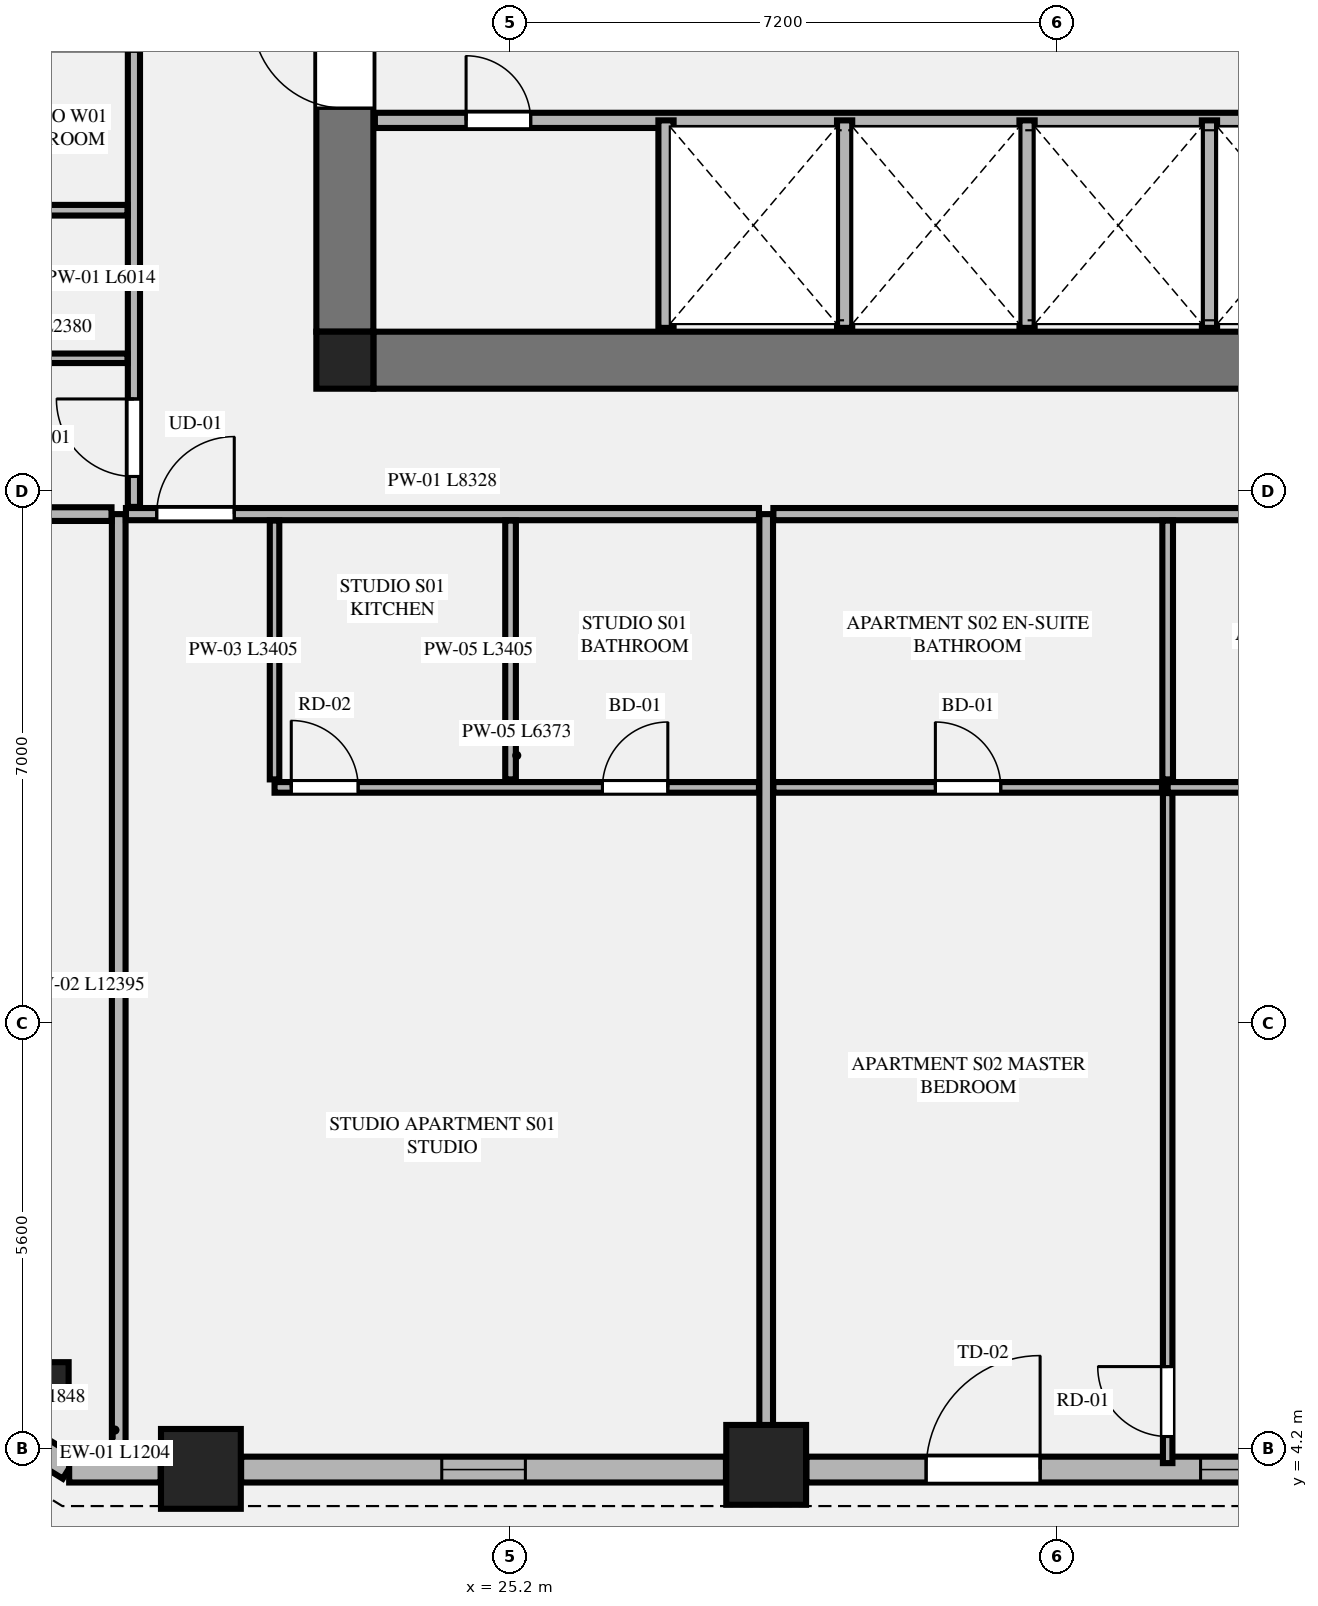
"""IFC4 building model, lengths in metres.
Left out: names, types, materials, properties, quantities, classifications, styles, units other than length and angle.
Written with IfcOpenShell. Run it as: python <this file> out.ifc"""

import sys

from ifc_helpers import new_model, si_unit, direction, frame, frame_2d, origin, origin_2d, place, context, subcontext, project, spatial, rectangle, extrude, element, fill, save


model = new_model("IFC4")
c1 = context("Model", 3, precision=1e-05, world=origin(), true_north=direction((0.0, 1.0)))
c2 = subcontext(c1, "Body", "Model", "MODEL_VIEW")
j1 = project(units=[si_unit("LENGTHUNIT", "METRE"), si_unit("PLANEANGLEUNIT", "RADIAN")], contexts=[c1])
p1 = place(None, origin())
s1 = spatial("IfcSite", under=j1, at=p1, CompositionType="ELEMENT")
p2 = place(p1, origin())
s2 = spatial("IfcBuilding", under=s1, at=p2, CompositionType="ELEMENT")
p3 = place(p2, frame((0.0, 0.0, 98.4)))
s3 = spatial("IfcBuildingStorey", under=s2, at=p3, CompositionType="ELEMENT", Elevation=98.4)
p4 = place(p3, frame((23.025, 18.525, 0.0), z_axis=(0.0, 0.0, 1.0), x_axis=(1.0, 0.0, 0.0)))
e1 = element("IfcColumn", 1, at=p4, inside=s3, PredefinedType="COLUMN", context=c2, shape_type="SweptSolid", body=[
    extrude(rectangle(XDim=0.75, YDim=0.75, at=origin_2d()), origin(), (0.0, 0.0, 1.0), 3.55),
])
p5 = place(p3, frame((23.4, 18.525, 0.0), z_axis=(0.0, 0.0, 1.0), x_axis=(1.0, 0.0, 0.0)))
e2 = element("IfcWall", 2, at=p5, inside=s3, PredefinedType="SHEAR", context=c2, shape_type="SweptSolid", body=[
    extrude(rectangle(XDim=18.0, YDim=0.75, at=frame_2d((9.0, 0.0))), origin(), (0.0, 0.0, 1.0), 3.34),
])
p6 = place(p3, frame((23.025, 18.9, 0.0), z_axis=(0.0, 0.0, 1.0), x_axis=(0.0, 1.0, 0.0)))
e3 = element("IfcWall", 3, at=p6, inside=s3, PredefinedType="SHEAR", context=c2, shape_type="SweptSolid", body=[
    extrude(rectangle(XDim=14.0, YDim=0.75, at=frame_2d((7.0, 0.0))), origin(), (0.0, 0.0, 1.0), 3.34),
])
p7 = place(p6, frame((2.94, 0.0, 0.0)))
e4 = element("IfcOpeningElement", 4, at=p7, cuts=e3, PredefinedType="OPENING", context=c2, shape_type="SweptSolid", body=[
    extrude(rectangle(XDim=1.22, YDim=2.25, at=frame_2d((0.61, 1.125))), frame((0.0, 0.385, 0.0), z_axis=(0.0, -1.0, 0.0), x_axis=(1.0, 0.0, 0.0)), (0.0, 0.0, 1.0), 0.77),
])
for number, where, z_axis, x_axis in (
    (5, (21.131, 3.939, 0.0), (0.0, 0.0, 1.0), (1.0, 0.0, 0.0)),
    (6, (28.568, 3.992, 0.0), (0.0, 0.0, 1.0), (1.0, 0.0, 0.0)),
):
    element("IfcColumn", number, at=place(p3, frame(where, z_axis=z_axis, x_axis=x_axis)), inside=s3, PredefinedType="COLUMN", context=c2, shape_type="SweptSolid", body=[
        extrude(rectangle(XDim=1.05, YDim=1.05, at=origin_2d()), origin(), (0.0, 0.0, 1.0), 3.55),
    ])
p8 = place(p3, frame((19.141, 5.093, 0.0), z_axis=(0.0, 0.0, 1.0), x_axis=(0.865160173452, -0.501495637342, 0.0)))
e7 = element("IfcColumn", 7, at=p8, inside=s3, PredefinedType="PILASTER", context=c2, shape_type="SweptSolid", body=[
    extrude(rectangle(XDim=0.5, YDim=0.35, at=origin_2d()), origin(), (0.0, 0.0, 1.0), 3.55),
])
p9 = place(p3, frame((23.42, 21.68, 0.0), z_axis=(0.0, 0.0, 1.0), x_axis=(1.0, 0.0, 0.0)))
e8 = element("IfcWall", 8, at=p9, inside=s3, PredefinedType="PLUMBINGWALL", context=c2, shape_type="SweptSolid", body=[
    extrude(rectangle(XDim=17.96, YDim=0.2, at=frame_2d((8.98, 0.0))), origin(), (0.0, 0.0, 1.0), 3.34),
])
p10 = place(p9, frame((11.6, 0.0, 0.0)))
e9 = element("IfcOpeningElement", 9, at=p10, cuts=e8, PredefinedType="OPENING", context=c2, shape_type="SweptSolid", body=[
    extrude(rectangle(XDim=1.1, YDim=2.2, at=frame_2d((0.55, 1.1))), frame((0.0, 0.11, 0.0), z_axis=(0.0, -1.0, 0.0), x_axis=(1.0, 0.0, 0.0)), (0.0, 0.0, 1.0), 0.22),
])
p11 = place(p9, frame((1.2, 0.0, 0.0)))
e10 = element("IfcOpeningElement", 10, at=p11, cuts=e8, PredefinedType="OPENING", context=c2, shape_type="SweptSolid", body=[
    extrude(rectangle(XDim=0.85, YDim=2.05, at=frame_2d((0.425, 1.025))), frame((0.0, 0.11, 0.0), z_axis=(0.0, -1.0, 0.0), x_axis=(1.0, 0.0, 0.0)), (0.0, 0.0, 1.0), 0.22),
])
p12 = place(p9, frame((13.55, 0.0, 0.0)))
e11 = element("IfcOpeningElement", 11, at=p12, cuts=e8, PredefinedType="OPENING", context=c2, shape_type="SweptSolid", body=[
    extrude(rectangle(XDim=0.85, YDim=2.05, at=frame_2d((0.425, 1.025))), frame((0.0, 0.11, 0.0), z_axis=(0.0, -1.0, 0.0), x_axis=(1.0, 0.0, 0.0)), (0.0, 0.0, 1.0), 0.22),
])
p13 = place(p9, frame((15.85, 0.0, 0.0)))
e12 = element("IfcOpeningElement", 12, at=p13, cuts=e8, PredefinedType="OPENING", context=c2, shape_type="SweptSolid", body=[
    extrude(rectangle(XDim=0.85, YDim=2.05, at=frame_2d((0.425, 1.025))), frame((0.0, 0.11, 0.0), z_axis=(0.0, -1.0, 0.0), x_axis=(1.0, 0.0, 0.0)), (0.0, 0.0, 1.0), 0.22),
])
for number, where, z_axis, x_axis in (
    (13, (27.25, 18.95, 0.0), (0.0, 0.0, 1.0), (0.0, 1.0, 0.0)),
    (14, (29.6, 18.95, 0.0), (0.0, 0.0, 1.0), (0.0, 1.0, 0.0)),
    (15, (32.0, 18.95, 0.0), (0.0, 0.0, 1.0), (0.0, 1.0, 0.0)),
    (16, (34.4, 18.95, 0.0), (0.0, 0.0, 1.0), (0.0, 1.0, 0.0)),
):
    element("IfcWall", number, at=place(p3, frame(where, z_axis=z_axis, x_axis=x_axis)), inside=s3, PredefinedType="PLUMBINGWALL", context=c2, shape_type="SweptSolid", body=[
        extrude(rectangle(XDim=2.73, YDim=0.2, at=frame_2d((1.365, 0.0))), origin(), (0.0, 0.0, 1.0), 3.34),
    ])
p14 = place(p3, frame((17.829, 4.923, 0.0), z_axis=(0.0, 0.0, 1.0), x_axis=(0.851798915137, -0.523868884523, 0.0)))
e17 = element("IfcWall", 17, at=p14, inside=s3, PredefinedType="STANDARD", context=c2, shape_type="SweptSolid", body=[
    extrude(rectangle(XDim=1.848, YDim=0.34, at=frame_2d((0.924, 0.0))), origin(), (0.0, 0.0, 1.0), 3.34),
])
p15 = place(p3, frame((19.398, 3.93, 0.0), z_axis=(0.0, 0.0, 1.0), x_axis=(1.0, 0.0, 0.0)))
e18 = element("IfcWall", 18, at=p15, inside=s3, PredefinedType="STANDARD", context=c2, shape_type="SweptSolid", body=[
    extrude(rectangle(XDim=1.204, YDim=0.34, at=frame_2d((0.602, 0.0))), origin(), (0.0, 0.0, 1.0), 3.34),
])
p16 = place(p3, frame((21.66, 3.93, 0.0), z_axis=(0.0, 0.0, 1.0), x_axis=(1.0, 0.0, 0.0)))
e19 = element("IfcWall", 19, at=p16, inside=s3, PredefinedType="STANDARD", context=c2, shape_type="SweptSolid", body=[
    extrude(rectangle(XDim=6.379, YDim=0.34, at=frame_2d((3.189, 0.0))), origin(), (0.0, 0.0, 1.0), 2.797),
])
p17 = place(p16, frame((2.64, 0.0, 0.75)))
e20 = element("IfcOpeningElement", 20, at=p17, cuts=e19, PredefinedType="OPENING", context=c2, shape_type="SweptSolid", body=[
    extrude(rectangle(XDim=1.1, YDim=1.897, at=frame_2d((0.55, 0.948))), frame((0.0, 0.18, 0.0), z_axis=(0.0, -1.0, 0.0), x_axis=(1.0, 0.0, 0.0)), (0.0, 0.0, 1.0), 0.36),
])
p18 = place(p3, frame((29.097, 3.93, 0.0), z_axis=(0.0, 0.0, 1.0), x_axis=(1.0, 0.0, 0.0)))
e21 = element("IfcWall", 21, at=p18, inside=s3, PredefinedType="STANDARD", context=c2, shape_type="SweptSolid", body=[
    extrude(rectangle(XDim=6.606, YDim=0.34, at=frame_2d((3.303, 0.0))), origin(), (0.0, 0.0, 1.0), 2.797),
])
p19 = place(p18, frame((1.575, 0.0, 0.0)))
e22 = element("IfcOpeningElement", 22, at=p19, cuts=e21, PredefinedType="OPENING", context=c2, shape_type="SweptSolid", body=[
    extrude(rectangle(XDim=1.5, YDim=2.3, at=frame_2d((0.75, 1.15))), frame((0.0, 0.18, 0.0), z_axis=(0.0, -1.0, 0.0), x_axis=(1.0, 0.0, 0.0)), (0.0, 0.0, 1.0), 0.36),
])
p20 = place(p18, frame((5.186, 0.0, 0.75)))
e23 = element("IfcOpeningElement", 23, at=p20, cuts=e21, PredefinedType="OPENING", context=c2, shape_type="SweptSolid", body=[
    extrude(rectangle(XDim=1.1, YDim=1.897, at=frame_2d((0.55, 0.948))), frame((0.0, 0.18, 0.0), z_axis=(0.0, -1.0, 0.0), x_axis=(1.0, 0.0, 0.0)), (0.0, 0.0, 1.0), 0.36),
])
p21 = place(p3, frame((20.05, 4.105, 0.0), z_axis=(0.0, 0.0, 1.0), x_axis=(0.0, 1.0, 0.0)))
e24 = element("IfcWall", 24, at=p21, inside=s3, PredefinedType="PARTITIONING", context=c2, shape_type="SweptSolid", body=[
    extrude(rectangle(XDim=12.395, YDim=0.18, at=frame_2d((6.198, 0.0))), origin(), (0.0, 0.0, 1.0), 3.34),
])
p22 = place(p3, frame((28.568, 4.105, 0.0), z_axis=(0.0, 0.0, 1.0), x_axis=(0.0, 1.0, 0.0)))
e25 = element("IfcWall", 25, at=p22, inside=s3, PredefinedType="PARTITIONING", context=c2, shape_type="SweptSolid", body=[
    extrude(rectangle(XDim=12.395, YDim=0.18, at=frame_2d((6.198, 0.0))), origin(), (0.0, 0.0, 1.0), 2.722),
])
p23 = place(p3, frame((20.145, 16.5, 0.0), z_axis=(0.0, 0.0, 1.0), x_axis=(1.0, 0.0, 0.0)))
e26 = element("IfcWall", 26, at=p23, inside=s3, PredefinedType="PARTITIONING", context=c2, shape_type="SweptSolid", body=[
    extrude(rectangle(XDim=8.328, YDim=0.16, at=frame_2d((4.164, 0.0))), origin(), (0.0, 0.0, 1.0), 3.34),
])
p24 = place(p23, frame((0.405, 0.0, 0.0)))
e27 = element("IfcOpeningElement", 27, at=p24, cuts=e26, PredefinedType="OPENING", context=c2, shape_type="SweptSolid", body=[
    extrude(rectangle(XDim=1.02, YDim=2.25, at=frame_2d((0.51, 1.125))), frame((0.0, 0.09, 0.0), z_axis=(0.0, -1.0, 0.0), x_axis=(1.0, 0.0, 0.0)), (0.0, 0.0, 1.0), 0.18),
])
p25 = place(p3, frame((22.1, 13.01, 0.0), z_axis=(0.0, 0.0, 1.0), x_axis=(0.0, 1.0, 0.0)))
e28 = element("IfcWall", 28, at=p25, inside=s3, PredefinedType="PARTITIONING", context=c2, shape_type="SweptSolid", body=[
    extrude(rectangle(XDim=3.405, YDim=0.125, at=frame_2d((1.703, 0.0))), origin(), (0.0, 0.0, 1.0), 2.722),
])
p26 = place(p3, frame((22.1, 12.905, 0.0), z_axis=(0.0, 0.0, 1.0), x_axis=(1.0, 0.0, 0.0)))
e29 = element("IfcWall", 29, at=p26, inside=s3, PredefinedType="PLUMBINGWALL", context=c2, shape_type="SweptSolid", body=[
    extrude(rectangle(XDim=6.373, YDim=0.14, at=frame_2d((3.187, 0.0))), origin(), (0.0, 0.0, 1.0), 3.34),
])
p27 = place(p26, frame((4.314, 0.0, 0.0)))
e30 = element("IfcOpeningElement", 30, at=p27, cuts=e29, PredefinedType="OPENING", context=c2, shape_type="SweptSolid", body=[
    extrude(rectangle(XDim=0.86, YDim=2.1, at=frame_2d((0.43, 1.05))), frame((0.0, 0.08, 0.0), z_axis=(0.0, -1.0, 0.0), x_axis=(1.0, 0.0, 0.0)), (0.0, 0.0, 1.0), 0.16),
])
p28 = place(p26, frame((0.22, 0.0, 0.0)))
e31 = element("IfcOpeningElement", 31, at=p28, cuts=e29, PredefinedType="OPENING", context=c2, shape_type="SweptSolid", body=[
    extrude(rectangle(XDim=0.88, YDim=2.15, at=frame_2d((0.44, 1.075))), frame((0.0, 0.08, 0.0), z_axis=(0.0, -1.0, 0.0), x_axis=(1.0, 0.0, 0.0)), (0.0, 0.0, 1.0), 0.16),
])
p29 = place(p3, frame((25.205, 13.01, 0.0), z_axis=(0.0, 0.0, 1.0), x_axis=(0.0, 1.0, 0.0)))
e32 = element("IfcWall", 32, at=p29, inside=s3, PredefinedType="PLUMBINGWALL", context=c2, shape_type="SweptSolid", body=[
    extrude(rectangle(XDim=3.405, YDim=0.14, at=frame_2d((1.703, 0.0))), origin(), (0.0, 0.0, 1.0), 3.34),
])
p30 = place(p3, frame((28.663, 16.5, 0.0), z_axis=(0.0, 0.0, 1.0), x_axis=(1.0, 0.0, 0.0)))
e33 = element("IfcWall", 33, at=p30, inside=s3, PredefinedType="PARTITIONING", context=c2, shape_type="SweptSolid", body=[
    extrude(rectangle(XDim=15.992, YDim=0.16, at=frame_2d((7.996, 0.0))), origin(), (0.0, 0.0, 1.0), 3.34),
])
p31 = place(p30, frame((14.087, 0.0, 0.0)))
e34 = element("IfcOpeningElement", 34, at=p31, cuts=e33, PredefinedType="OPENING", context=c2, shape_type="SweptSolid", body=[
    extrude(rectangle(XDim=1.02, YDim=2.25, at=frame_2d((0.51, 1.125))), frame((0.0, 0.09, 0.0), z_axis=(0.0, -1.0, 0.0), x_axis=(1.0, 0.0, 0.0)), (0.0, 0.0, 1.0), 0.18),
])
p32 = place(p3, frame((33.85, 12.905, 0.0), z_axis=(0.0, 0.0, 1.0), x_axis=(1.0, 0.0, 0.0)))
e35 = element("IfcWall", 35, at=p32, inside=s3, PredefinedType="PLUMBINGWALL", context=c2, shape_type="SweptSolid", body=[
    extrude(rectangle(XDim=8.65, YDim=0.14, at=frame_2d((4.325, 0.0))), origin(), (0.0, 0.0, 1.0), 3.34),
])
p33 = place(p32, frame((2.2, 0.0, 0.0)))
e36 = element("IfcOpeningElement", 36, at=p33, cuts=e35, PredefinedType="OPENING", context=c2, shape_type="SweptSolid", body=[
    extrude(rectangle(XDim=0.86, YDim=2.1, at=frame_2d((0.43, 1.05))), frame((0.0, 0.08, 0.0), z_axis=(0.0, -1.0, 0.0), x_axis=(1.0, 0.0, 0.0)), (0.0, 0.0, 1.0), 0.16),
])
p34 = place(p32, frame((5.45, 0.0, 0.0)))
e37 = element("IfcOpeningElement", 37, at=p34, cuts=e35, PredefinedType="OPENING", context=c2, shape_type="SweptSolid", body=[
    extrude(rectangle(XDim=0.88, YDim=2.15, at=frame_2d((0.44, 1.075))), frame((0.0, 0.08, 0.0), z_axis=(0.0, -1.0, 0.0), x_axis=(1.0, 0.0, 0.0)), (0.0, 0.0, 1.0), 0.16),
])
p35 = place(p3, frame((28.663, 12.905, 0.0), z_axis=(0.0, 0.0, 1.0), x_axis=(1.0, 0.0, 0.0)))
e38 = element("IfcWall", 38, at=p35, inside=s3, PredefinedType="PLUMBINGWALL", context=c2, shape_type="SweptSolid", body=[
    extrude(rectangle(XDim=5.112, YDim=0.14, at=frame_2d((2.556, 0.0))), origin(), (0.0, 0.0, 1.0), 3.34),
])
p36 = place(p35, frame((2.131, 0.0, 0.0)))
e39 = element("IfcOpeningElement", 39, at=p36, cuts=e38, PredefinedType="OPENING", context=c2, shape_type="SweptSolid", body=[
    extrude(rectangle(XDim=0.86, YDim=2.1, at=frame_2d((0.43, 1.05))), frame((0.0, 0.08, 0.0), z_axis=(0.0, -1.0, 0.0), x_axis=(1.0, 0.0, 0.0)), (0.0, 0.0, 1.0), 0.16),
])
p37 = place(p3, frame((33.85, 13.01, 0.0), z_axis=(0.0, 0.0, 1.0), x_axis=(0.0, 1.0, 0.0)))
e40 = element("IfcWall", 40, at=p37, inside=s3, PredefinedType="PLUMBINGWALL", context=c2, shape_type="SweptSolid", body=[
    extrude(rectangle(XDim=3.405, YDim=0.14, at=frame_2d((1.703, 0.0))), origin(), (0.0, 0.0, 1.0), 3.34),
])
p38 = place(p3, frame((33.85, 4.015, 0.0), z_axis=(0.0, 0.0, 1.0), x_axis=(0.0, 1.0, 0.0)))
e41 = element("IfcWall", 41, at=p38, inside=s3, PredefinedType="PARTITIONING", context=c2, shape_type="SweptSolid", body=[
    extrude(rectangle(XDim=8.815, YDim=0.125, at=frame_2d((4.408, 0.0))), origin(), (0.0, 0.0, 1.0), 3.34),
])
p39 = place(p38, frame((0.35, 0.0, 0.0)))
e42 = element("IfcOpeningElement", 42, at=p39, cuts=e41, PredefinedType="OPENING", context=c2, shape_type="SweptSolid", body=[
    extrude(rectangle(XDim=0.92, YDim=2.15, at=frame_2d((0.46, 1.075))), frame((0.0, 0.073, 0.0), z_axis=(0.0, -1.0, 0.0), x_axis=(1.0, 0.0, 0.0)), (0.0, 0.0, 1.0), 0.145),
])
p40 = place(p3, frame((12.185, 16.5, 0.0), z_axis=(0.0, 0.0, 1.0), x_axis=(1.0, 0.0, 0.0)))
e43 = element("IfcWall", 43, at=p40, inside=s3, PredefinedType="PARTITIONING", context=c2, shape_type="SweptSolid", body=[
    extrude(rectangle(XDim=7.77, YDim=0.18, at=frame_2d((3.885, 0.0))), origin(), (0.0, 0.0, 1.0), 3.34),
])
p41 = place(p3, frame((20.25, 16.595, 0.0), z_axis=(0.0, 0.0, 1.0), x_axis=(0.0, 1.0, 0.0)))
e44 = element("IfcWall", 44, at=p41, inside=s3, PredefinedType="PARTITIONING", context=c2, shape_type="SweptSolid", body=[
    extrude(rectangle(XDim=6.014, YDim=0.16, at=frame_2d((3.007, 0.0))), origin(), (0.0, 0.0, 1.0), 3.34),
])
p42 = place(p41, frame((0.4, 0.0, 0.0)))
e45 = element("IfcOpeningElement", 45, at=p42, cuts=e44, PredefinedType="OPENING", context=c2, shape_type="SweptSolid", body=[
    extrude(rectangle(XDim=1.02, YDim=2.25, at=frame_2d((0.51, 1.125))), frame((0.0, 0.09, 0.0), z_axis=(0.0, -1.0, 0.0), x_axis=(1.0, 0.0, 0.0)), (0.0, 0.0, 1.0), 0.18),
])
p43 = place(p3, frame((17.785, 18.55, 0.0), z_axis=(0.0, 0.0, 1.0), x_axis=(1.0, 0.0, 0.0)))
e46 = element("IfcWall", 46, at=p43, inside=s3, PredefinedType="PARTITIONING", context=c2, shape_type="SweptSolid", body=[
    extrude(rectangle(XDim=2.38, YDim=0.125, at=frame_2d((1.19, 0.0))), origin(), (0.0, 0.0, 1.0), 2.722),
])
p44 = place(p3, frame((17.785, 20.498, 0.0), z_axis=(0.0, 0.0, 1.0), x_axis=(1.0, 0.0, 0.0)))
e47 = element("IfcWall", 47, at=p44, inside=s3, PredefinedType="PLUMBINGWALL", context=c2, shape_type="SweptSolid", body=[
    extrude(rectangle(XDim=2.38, YDim=0.14, at=frame_2d((1.19, 0.0))), origin(), (0.0, 0.0, 1.0), 3.34),
])
p45 = place(p7, origin())
e48 = element("IfcDoor", 48, at=p45, inside=s3, OperationType="SINGLE_SWING_RIGHT", PredefinedType="DOOR", context=c2, shape_type="SweptSolid", body=[
    extrude(rectangle(XDim=1.22, YDim=2.25, at=frame_2d((0.61, 1.125))), frame((0.0, 0.025, 0.0), z_axis=(0.0, -1.0, 0.0), x_axis=(1.0, 0.0, 0.0)), (0.0, 0.0, 1.0), 0.05),
])
fill(e4, e48)
p46 = place(p11, origin())
e49 = element("IfcDoor", 49, at=p46, inside=s3, OperationType="SINGLE_SWING_LEFT", PredefinedType="DOOR", context=c2, shape_type="SweptSolid", body=[
    extrude(rectangle(XDim=0.85, YDim=2.05, at=frame_2d((0.425, 1.025))), frame((0.0, 0.025, 0.0), z_axis=(0.0, -1.0, 0.0), x_axis=(1.0, 0.0, 0.0)), (0.0, 0.0, 1.0), 0.05),
])
fill(e10, e49)
p47 = place(p17, origin())
e50 = element("IfcWindow", 50, at=p47, inside=s3, PartitioningType="SINGLE_PANEL", PredefinedType="WINDOW", context=c2, shape_type="SweptSolid", body=[
    extrude(rectangle(XDim=1.1, YDim=1.897, at=frame_2d((0.55, 0.948))), frame((0.0, 0.03, 0.0), z_axis=(0.0, -1.0, 0.0), x_axis=(1.0, 0.0, 0.0)), (0.0, 0.0, 1.0), 0.06),
])
fill(e20, e50)
p48 = place(p19, origin())
e51 = element("IfcDoor", 51, at=p48, inside=s3, OperationType="SINGLE_SWING_RIGHT", PredefinedType="DOOR", context=c2, shape_type="SweptSolid", body=[
    extrude(rectangle(XDim=1.5, YDim=2.3, at=frame_2d((0.75, 1.15))), frame((0.0, 0.025, 0.0), z_axis=(0.0, -1.0, 0.0), x_axis=(1.0, 0.0, 0.0)), (0.0, 0.0, 1.0), 0.05),
])
fill(e22, e51)
p49 = place(p27, origin())
e52 = element("IfcDoor", 52, at=p49, inside=s3, OperationType="SINGLE_SWING_RIGHT", PredefinedType="DOOR", context=c2, shape_type="SweptSolid", body=[
    extrude(rectangle(XDim=0.86, YDim=2.1, at=frame_2d((0.43, 1.05))), frame((0.0, 0.025, 0.0), z_axis=(0.0, -1.0, 0.0), x_axis=(1.0, 0.0, 0.0)), (0.0, 0.0, 1.0), 0.05),
])
fill(e30, e52)
p50 = place(p24, origin())
e53 = element("IfcDoor", 53, at=p50, inside=s3, OperationType="SINGLE_SWING_RIGHT", PredefinedType="DOOR", context=c2, shape_type="SweptSolid", body=[
    extrude(rectangle(XDim=1.02, YDim=2.25, at=frame_2d((0.51, 1.125))), frame((0.0, 0.025, 0.0), z_axis=(0.0, -1.0, 0.0), x_axis=(1.0, 0.0, 0.0)), (0.0, 0.0, 1.0), 0.05),
])
fill(e27, e53)
p51 = place(p28, origin())
e54 = element("IfcDoor", 54, at=p51, inside=s3, OperationType="SINGLE_SWING_LEFT", PredefinedType="DOOR", context=c2, shape_type="SweptSolid", body=[
    extrude(rectangle(XDim=0.88, YDim=2.15, at=frame_2d((0.44, 1.075))), frame((0.0, 0.025, 0.0), z_axis=(0.0, -1.0, 0.0), x_axis=(1.0, 0.0, 0.0)), (0.0, 0.0, 1.0), 0.05),
])
fill(e31, e54)
p52 = place(p36, origin())
e55 = element("IfcDoor", 55, at=p52, inside=s3, OperationType="SINGLE_SWING_LEFT", PredefinedType="DOOR", context=c2, shape_type="SweptSolid", body=[
    extrude(rectangle(XDim=0.86, YDim=2.1, at=frame_2d((0.43, 1.05))), frame((0.0, 0.025, 0.0), z_axis=(0.0, -1.0, 0.0), x_axis=(1.0, 0.0, 0.0)), (0.0, 0.0, 1.0), 0.05),
])
fill(e39, e55)
p53 = place(p39, origin())
e56 = element("IfcDoor", 56, at=p53, inside=s3, OperationType="SINGLE_SWING_RIGHT", PredefinedType="DOOR", context=c2, shape_type="SweptSolid", body=[
    extrude(rectangle(XDim=0.92, YDim=2.15, at=frame_2d((0.46, 1.075))), frame((0.0, 0.025, 0.0), z_axis=(0.0, -1.0, 0.0), x_axis=(1.0, 0.0, 0.0)), (0.0, 0.0, 1.0), 0.05),
])
fill(e42, e56)
p54 = place(p42, origin())
e57 = element("IfcDoor", 57, at=p54, inside=s3, OperationType="SINGLE_SWING_RIGHT", PredefinedType="DOOR", context=c2, shape_type="SweptSolid", body=[
    extrude(rectangle(XDim=1.02, YDim=2.25, at=frame_2d((0.51, 1.125))), frame((0.0, 0.025, 0.0), z_axis=(0.0, -1.0, 0.0), x_axis=(1.0, 0.0, 0.0)), (0.0, 0.0, 1.0), 0.05),
])
fill(e45, e57)
p55 = place(p20, origin())
e58 = element("IfcWindow", 58, at=p55, inside=s3, PartitioningType="SINGLE_PANEL", PredefinedType="WINDOW", context=c2, shape_type="SweptSolid", body=[
    extrude(rectangle(XDim=1.1, YDim=1.897, at=frame_2d((0.55, 0.948))), frame((0.0, 0.03, 0.0), z_axis=(0.0, -1.0, 0.0), x_axis=(1.0, 0.0, 0.0)), (0.0, 0.0, 1.0), 0.06),
])
fill(e23, e58)
save(model, sys.argv[1])
